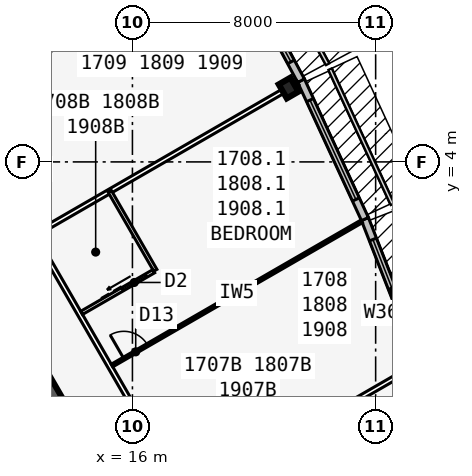
"""IFC4 building model, lengths in metres.
Left out: names, types, materials, properties, quantities, classifications, styles, units other than length and angle.
Written with IfcOpenShell. Run it as: python <this file> out.ifc"""

import sys

from ifc_helpers import new_model, si_unit, direction, frame, frame_2d, origin, origin_2d, place, context, subcontext, project, spatial, rectangle, i_section, extrude, element, fill, save


model = new_model("IFC4")
c1 = context("Model", 3, precision=1e-05, world=origin(), true_north=direction((0.0, 1.0)))
c2 = subcontext(c1, "Body", "Model", "MODEL_VIEW")
j1 = project(units=[si_unit("LENGTHUNIT", "METRE"), si_unit("PLANEANGLEUNIT", "RADIAN")], contexts=[c1])
p1 = place(None, origin())
s1 = spatial("IfcSite", under=j1, at=p1, CompositionType="ELEMENT")
p2 = place(p1, origin())
s2 = spatial("IfcBuilding", under=s1, at=p2, CompositionType="ELEMENT")
p3 = place(p2, frame((0.0, 0.0, 69.3)))
s3 = spatial("IfcBuildingStorey", under=s2, at=p3, CompositionType="ELEMENT", Elevation=69.3)
p4 = place(p3, frame((16.5, -9.526, 0.0), z_axis=(0.0, 0.0, 1.0), x_axis=(-0.499999749417, 0.866025548458, 0.0)))
e1 = element("IfcWall", 1, at=p4, inside=s3, PredefinedType="SHEAR", context=c2, shape_type="SweptSolid", body=[
    extrude(rectangle(XDim=33.0, YDim=0.9, at=frame_2d((16.5, 0.0))), origin(), (0.0, 0.0, 1.0), 3.4),
])
p5 = place(p4, frame((14.15, 0.0, 0.0)))
e2 = element("IfcOpeningElement", 2, at=p5, cuts=e1, PredefinedType="OPENING", context=c2, shape_type="SweptSolid", body=[
    extrude(rectangle(XDim=1.8, YDim=2.13, at=frame_2d((0.9, 1.065))), frame((0.0, 0.46, 0.0), z_axis=(0.0, -1.0, 0.0), x_axis=(1.0, 0.0, 0.0)), (0.0, 0.0, 1.0), 0.92),
])
p6 = place(p4, frame((12.6, 0.0, 0.0)))
e3 = element("IfcOpeningElement", 3, at=p6, cuts=e1, PredefinedType="OPENING", context=c2, shape_type="SweptSolid", body=[
    extrude(rectangle(XDim=1.0, YDim=2.13, at=frame_2d((0.5, 1.065))), frame((0.0, 0.46, 0.0), z_axis=(0.0, -1.0, 0.0), x_axis=(1.0, 0.0, 0.0)), (0.0, 0.0, 1.0), 0.92),
])
p7 = place(p3, frame((21.137, 6.43, 0.0), z_axis=(0.0, 0.0, 1.0), x_axis=(0.866025403784, 0.5, 0.0)))
e4 = element("IfcColumn", 4, at=p7, inside=s3, PredefinedType="COLUMN", context=c2, shape_type="SweptSolid", body=[
    extrude(i_section(OverallWidth=0.442, OverallDepth=0.531, WebThickness=0.066, FlangeThickness=0.106, at=origin_2d()), origin(), (0.0, 0.0, 1.0), 3.4),
])
p8 = place(p3, frame((15.312, 8.84, 0.0), z_axis=(0.0, 0.0, 1.0), x_axis=(0.866025403784, 0.5, 0.0)))
e5 = element("IfcColumn", 5, at=p8, inside=s3, PredefinedType="COLUMN", context=c2, shape_type="SweptSolid", body=[
    extrude(rectangle(XDim=2.4, YDim=2.4, at=origin_2d()), origin(), (0.0, 0.0, 1.0), 3.4),
])
p9 = place(p3, frame((25.486, -2.584, 0.0), z_axis=(0.0, 0.0, 1.0), x_axis=(-0.364013463868, 0.931393685894, 0.0)))
e6 = element("IfcWall", 6, at=p9, inside=s3, PredefinedType="STANDARD", context=c2, shape_type="SweptSolid", body=[
    extrude(rectangle(XDim=5.058, YDim=0.25, at=frame_2d((2.529, 0.0))), origin(), (0.0, 0.0, 1.0), 3.235),
])
p10 = place(p9, frame((0.729, 0.0, 0.45)))
e7 = element("IfcOpeningElement", 7, at=p10, cuts=e6, PredefinedType="OPENING", context=c2, shape_type="SweptSolid", body=[
    extrude(rectangle(XDim=3.6, YDim=2.4, at=frame_2d((1.8, 1.2))), frame((0.0, 0.135, 0.0), z_axis=(0.0, -1.0, 0.0), x_axis=(1.0, 0.0, 0.0)), (0.0, 0.0, 1.0), 0.27),
])
p11 = place(p3, frame((23.648, 2.119, 0.0), z_axis=(0.0, 0.0, 1.0), x_axis=(-0.419203100754, 0.907892482796, 0.0)))
e8 = element("IfcWall", 8, at=p11, inside=s3, PredefinedType="STANDARD", context=c2, shape_type="SweptSolid", body=[
    extrude(rectangle(XDim=5.021, YDim=0.25, at=frame_2d((2.51, 0.0))), origin(), (0.0, 0.0, 1.0), 3.235),
])
p12 = place(p11, frame((0.71, 0.0, 0.45)))
e9 = element("IfcOpeningElement", 9, at=p12, cuts=e8, PredefinedType="OPENING", context=c2, shape_type="SweptSolid", body=[
    extrude(rectangle(XDim=3.6, YDim=2.4, at=frame_2d((1.8, 1.2))), frame((0.0, 0.135, 0.0), z_axis=(0.0, -1.0, 0.0), x_axis=(1.0, 0.0, 0.0)), (0.0, 0.0, 1.0), 0.27),
])
p13 = place(p3, frame((21.547, 6.671, 0.0), z_axis=(0.0, 0.0, 1.0), x_axis=(-0.473412820489, 0.880840678782, 0.0)))
e10 = element("IfcWall", 10, at=p13, inside=s3, PredefinedType="STANDARD", context=c2, shape_type="SweptSolid", body=[
    extrude(rectangle(XDim=5.002, YDim=0.25, at=frame_2d((2.501, 0.0))), origin(), (0.0, 0.0, 1.0), 3.235),
])
p14 = place(p13, frame((0.701, 0.0, 0.45)))
e11 = element("IfcOpeningElement", 11, at=p14, cuts=e10, PredefinedType="OPENING", context=c2, shape_type="SweptSolid", body=[
    extrude(rectangle(XDim=3.6, YDim=2.4, at=frame_2d((1.8, 1.2))), frame((0.0, 0.135, 0.0), z_axis=(0.0, -1.0, 0.0), x_axis=(1.0, 0.0, 0.0)), (0.0, 0.0, 1.0), 0.27),
])
p15 = place(p3, frame((20.027, -10.985, 0.0), z_axis=(0.0, 0.0, 1.0), x_axis=(-0.500001677587, 0.866024435227, 0.0)))
e12 = element("IfcWall", 12, at=p15, inside=s3, PredefinedType="PARTITIONING", context=c2, shape_type="SweptSolid", body=[
    extrude(rectangle(XDim=39.054, YDim=0.15, at=frame_2d((19.527, 0.0))), origin(), (0.0, 0.0, 1.0), 3.235),
])
p16 = place(p15, frame((0.352, 0.0, 0.0)))
e13 = element("IfcOpeningElement", 13, at=p16, cuts=e12, PredefinedType="OPENING", context=c2, shape_type="SweptSolid", body=[
    extrude(rectangle(XDim=0.95, YDim=2.13, at=frame_2d((0.475, 1.065))), frame((0.0, 0.085, 0.0), z_axis=(0.0, -1.0, 0.0), x_axis=(1.0, 0.0, 0.0)), (0.0, 0.0, 1.0), 0.17),
])
p17 = place(p15, frame((6.552, 0.0, 0.0)))
e14 = element("IfcOpeningElement", 14, at=p17, cuts=e12, PredefinedType="OPENING", context=c2, shape_type="SweptSolid", body=[
    extrude(rectangle(XDim=0.95, YDim=2.13, at=frame_2d((0.475, 1.065))), frame((0.0, 0.085, 0.0), z_axis=(0.0, -1.0, 0.0), x_axis=(1.0, 0.0, 0.0)), (0.0, 0.0, 1.0), 0.17),
])
p18 = place(p15, frame((16.552, 0.0, 0.0)))
e15 = element("IfcOpeningElement", 15, at=p18, cuts=e12, PredefinedType="OPENING", context=c2, shape_type="SweptSolid", body=[
    extrude(rectangle(XDim=0.95, YDim=2.13, at=frame_2d((0.475, 1.065))), frame((0.0, 0.085, 0.0), z_axis=(0.0, -1.0, 0.0), x_axis=(1.0, 0.0, 0.0)), (0.0, 0.0, 1.0), 0.17),
])
p19 = place(p15, frame((25.952, 0.0, 0.0)))
e16 = element("IfcOpeningElement", 16, at=p19, cuts=e12, PredefinedType="OPENING", context=c2, shape_type="SweptSolid", body=[
    extrude(rectangle(XDim=0.95, YDim=2.13, at=frame_2d((0.475, 1.065))), frame((0.0, 0.085, 0.0), z_axis=(0.0, -1.0, 0.0), x_axis=(1.0, 0.0, 0.0)), (0.0, 0.0, 1.0), 0.17),
])
p20 = place(p15, frame((36.546, 0.0, 0.0)))
e17 = element("IfcOpeningElement", 17, at=p20, cuts=e12, PredefinedType="OPENING", context=c2, shape_type="SweptSolid", body=[
    extrude(rectangle(XDim=0.95, YDim=2.13, at=frame_2d((0.475, 1.065))), frame((0.0, 0.085, 0.0), z_axis=(0.0, -1.0, 0.0), x_axis=(1.0, 0.0, 0.0)), (0.0, 0.0, 1.0), 0.17),
])
p21 = place(p3, frame((17.829, -7.027, 0.0), z_axis=(0.0, 0.0, 1.0), x_axis=(0.866032659912, 0.499987431809, 0.0)))
e18 = element("IfcWall", 18, at=p21, inside=s3, PredefinedType="PARTITIONING", context=c2, shape_type="SweptSolid", body=[
    extrude(rectangle(XDim=8.72, YDim=0.15, at=frame_2d((4.36, 0.0))), origin(), (0.0, 0.0, 1.0), 2.389),
])
p22 = place(p3, frame((15.329, -2.697, 0.0), z_axis=(0.0, 0.0, 1.0), x_axis=(0.866018409083, 0.500012114982, 0.0)))
e19 = element("IfcWall", 19, at=p22, inside=s3, PredefinedType="PARTITIONING", context=c2, shape_type="SweptSolid", body=[
    extrude(rectangle(XDim=9.485, YDim=0.1, at=frame_2d((4.742, 0.0))), origin(), (0.0, 0.0, 1.0), 2.389),
])
p23 = place(p22, frame((0.45, 0.0, 0.0)))
e20 = element("IfcOpeningElement", 20, at=p23, cuts=e19, PredefinedType="OPENING", context=c2, shape_type="SweptSolid", body=[
    extrude(rectangle(XDim=0.9, YDim=2.13, at=frame_2d((0.45, 1.065))), frame((0.0, 0.06, 0.0), z_axis=(0.0, -1.0, 0.0), x_axis=(1.0, 0.0, 0.0)), (0.0, 0.0, 1.0), 0.12),
])
p24 = place(p3, frame((12.829, 1.633, 0.0), z_axis=(0.0, 0.0, 1.0), x_axis=(0.866026934769, 0.499997348248, 0.0)))
e21 = element("IfcWall", 21, at=p24, inside=s3, PredefinedType="PARTITIONING", context=c2, shape_type="SweptSolid", body=[
    extrude(rectangle(XDim=9.943, YDim=0.15, at=frame_2d((4.971, 0.0))), origin(), (0.0, 0.0, 1.0), 2.389),
])
p25 = place(p3, frame((10.329, 5.963, 0.0), z_axis=(0.0, 0.0, 1.0), x_axis=(0.866021688545, 0.500006434927, 0.0)))
e22 = element("IfcWall", 22, at=p25, inside=s3, PredefinedType="PARTITIONING", context=c2, shape_type="SweptSolid", body=[
    extrude(rectangle(XDim=10.096, YDim=0.1, at=frame_2d((5.048, 0.0))), origin(), (0.0, 0.0, 1.0), 2.389),
])
p26 = place(p25, frame((0.45, 0.0, 0.0)))
e23 = element("IfcOpeningElement", 23, at=p26, cuts=e22, PredefinedType="OPENING", context=c2, shape_type="SweptSolid", body=[
    extrude(rectangle(XDim=0.9, YDim=2.13, at=frame_2d((0.45, 1.065))), frame((0.0, 0.06, 0.0), z_axis=(0.0, -1.0, 0.0), x_axis=(1.0, 0.0, 0.0)), (0.0, 0.0, 1.0), 0.12),
])
p27 = place(p3, frame((16.753, 0.435, 0.0), z_axis=(0.0, 0.0, 1.0), x_axis=(-0.499990139034, 0.866031096941, 0.0)))
e24 = element("IfcWall", 24, at=p27, inside=s3, PredefinedType="PLUMBINGWALL", context=c2, shape_type="SweptSolid", body=[
    extrude(rectangle(XDim=3.0, YDim=0.12, at=frame_2d((1.5, 0.0))), origin(), (0.0, 0.0, 1.0), 3.235),
])
p28 = place(p3, frame((14.329, -0.965, 0.0), z_axis=(0.0, 0.0, 1.0), x_axis=(0.866035715982, 0.499982138324, 0.0)))
e25 = element("IfcWall", 25, at=p28, inside=s3, PredefinedType="PLUMBINGWALL", context=c2, shape_type="SweptSolid", body=[
    extrude(rectangle(XDim=2.74, YDim=0.12, at=frame_2d((1.37, 0.0))), origin(), (0.0, 0.0, 1.0), 3.235),
])
p29 = place(p28, frame((1.55, 0.0, 0.0)))
e26 = element("IfcOpeningElement", 26, at=p29, cuts=e25, PredefinedType="OPENING", context=c2, shape_type="SweptSolid", body=[
    extrude(rectangle(XDim=0.9, YDim=2.13, at=frame_2d((0.45, 1.065))), frame((0.0, 0.07, 0.0), z_axis=(0.0, -1.0, 0.0), x_axis=(1.0, 0.0, 0.0)), (0.0, 0.0, 1.0), 0.14),
])
p30 = place(p10, origin())
e27 = element("IfcWindow", 27, at=p30, inside=s3, PartitioningType="SINGLE_PANEL", PredefinedType="WINDOW", context=c2, shape_type="SweptSolid", body=[
    extrude(rectangle(XDim=3.6, YDim=2.4, at=frame_2d((1.8, 1.2))), frame((0.0, 0.03, 0.0), z_axis=(0.0, -1.0, 0.0), x_axis=(1.0, 0.0, 0.0)), (0.0, 0.0, 1.0), 0.06),
])
fill(e7, e27)
p31 = place(p12, origin())
e28 = element("IfcWindow", 28, at=p31, inside=s3, PartitioningType="SINGLE_PANEL", PredefinedType="WINDOW", context=c2, shape_type="SweptSolid", body=[
    extrude(rectangle(XDim=3.6, YDim=2.4, at=frame_2d((1.8, 1.2))), frame((0.0, 0.03, 0.0), z_axis=(0.0, -1.0, 0.0), x_axis=(1.0, 0.0, 0.0)), (0.0, 0.0, 1.0), 0.06),
])
fill(e9, e28)
p32 = place(p14, origin())
e29 = element("IfcWindow", 29, at=p32, inside=s3, PartitioningType="SINGLE_PANEL", PredefinedType="WINDOW", context=c2, shape_type="SweptSolid", body=[
    extrude(rectangle(XDim=3.6, YDim=2.4, at=frame_2d((1.8, 1.2))), frame((0.0, 0.03, 0.0), z_axis=(0.0, -1.0, 0.0), x_axis=(1.0, 0.0, 0.0)), (0.0, 0.0, 1.0), 0.06),
])
fill(e11, e29)
p33 = place(p23, origin())
e30 = element("IfcDoor", 30, at=p33, inside=s3, OperationType="SINGLE_SWING_LEFT", PredefinedType="DOOR", context=c2, shape_type="SweptSolid", body=[
    extrude(rectangle(XDim=0.9, YDim=2.13, at=frame_2d((0.45, 1.065))), frame((0.0, 0.025, 0.0), z_axis=(0.0, -1.0, 0.0), x_axis=(1.0, 0.0, 0.0)), (0.0, 0.0, 1.0), 0.05),
])
fill(e20, e30)
p34 = place(p29, origin())
e31 = element("IfcDoor", 31, at=p34, inside=s3, OperationType="SLIDING_TO_LEFT", PredefinedType="DOOR", context=c2, shape_type="SweptSolid", body=[
    extrude(rectangle(XDim=0.9, YDim=2.13, at=frame_2d((0.45, 1.065))), frame((0.0, 0.025, 0.0), z_axis=(0.0, -1.0, 0.0), x_axis=(1.0, 0.0, 0.0)), (0.0, 0.0, 1.0), 0.05),
])
fill(e26, e31)
save(model, sys.argv[1])
